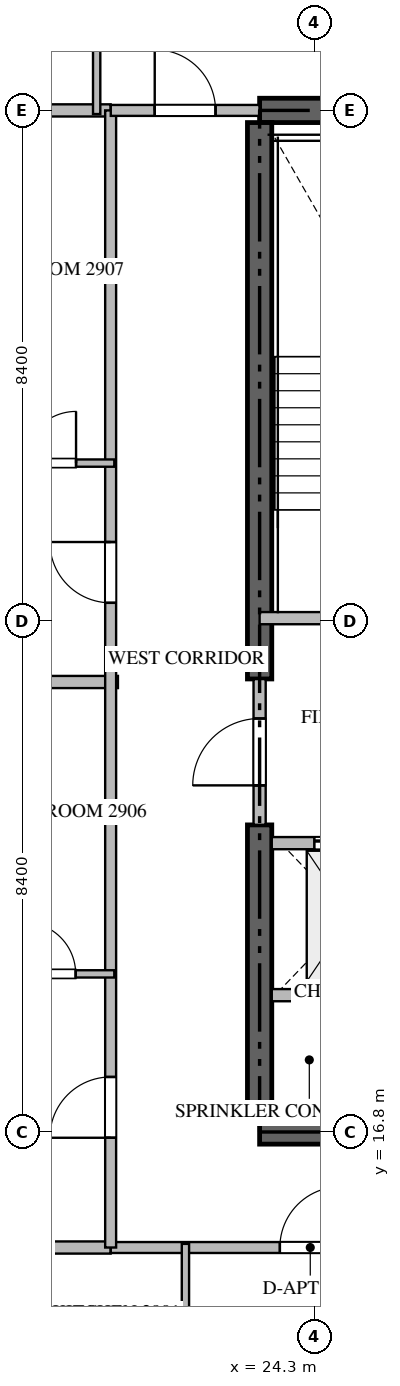
"""IFC4 building model, lengths in metres.
Left out: names, types, materials, properties, quantities, classifications, styles, units other than length and angle.
Written with IfcOpenShell. Run it as: python <this file> out.ifc"""

import sys

from ifc_helpers import new_model, si_unit, direction, frame, frame_2d, origin, place, context, subcontext, project, spatial, rectangle, extrude, source, transform, mapped, element, fill, save


model = new_model("IFC4")
c1 = context("Model", 3, precision=1e-05, world=origin(), true_north=direction((0.0, 1.0)))
c2 = subcontext(c1, "Body", "Model", "MODEL_VIEW")
j1 = project(units=[si_unit("LENGTHUNIT", "METRE"), si_unit("PLANEANGLEUNIT", "RADIAN")], contexts=[c1])
p1 = place(None, origin())
s1 = spatial("IfcSite", under=j1, at=p1, CompositionType="ELEMENT")
p2 = place(p1, origin())
s2 = spatial("IfcBuilding", under=s1, at=p2, CompositionType="ELEMENT")
p3 = place(p2, frame((0.0, 0.0, 120.15)))
s3 = spatial("IfcBuildingStorey", under=s2, at=p3, CompositionType="ELEMENT", Elevation=120.15)
for number, where, z_axis, x_axis in (
    (1, (23.4, 16.8, -0.44), (0.0, 0.0, 1.0), (1.0, 0.0, 0.0)),
    (2, (41.4, 33.6, -0.44), (0.0, 0.0, 1.0), (-1.0, 0.0, 0.0)),
):
    element("IfcWall", number, at=place(p3, frame(where, z_axis=z_axis, x_axis=x_axis)), inside=s3, PredefinedType="SHEAR", context=c2, shape_type="SweptSolid", body=[
        extrude(rectangle(XDim=18.0, YDim=0.4, at=frame_2d((9.0, 0.0))), origin(), (0.0, 0.0, 1.0), 3.928),
    ])
p4 = place(p3, frame((23.4, 17.0, -0.44), z_axis=(0.0, 0.0, 1.0), x_axis=(0.0, 1.0, 0.0)))
e3 = element("IfcWall", 3, at=p4, inside=s3, PredefinedType="SHEAR", context=c2, shape_type="SweptSolid", body=[
    extrude(rectangle(XDim=4.85, YDim=0.4, at=frame_2d((2.425, 0.0))), origin(), (0.0, 0.0, 1.0), 3.928),
])
p5 = place(p3, frame((23.4, 24.25, -0.44), z_axis=(0.0, 0.0, 1.0), x_axis=(0.0, 1.0, 0.0)))
e4 = element("IfcWall", 4, at=p5, inside=s3, PredefinedType="SHEAR", context=c2, shape_type="SweptSolid", body=[
    extrude(rectangle(XDim=9.15, YDim=0.4, at=frame_2d((4.575, 0.0))), origin(), (0.0, 0.0, 1.0), 3.928),
])
p6 = place(p3, frame((23.4, 25.25, 0.0), z_axis=(0.0, 0.0, 1.0), x_axis=(1.0, 0.0, 0.0)))
e5 = element("IfcWall", 5, at=p6, inside=s3, PredefinedType="STANDARD", context=c2, shape_type="SweptSolid", body=[
    extrude(rectangle(XDim=4.45, YDim=0.2, at=frame_2d((2.225, 0.0))), origin(), (0.0, 0.0, 1.0), 3.49),
])
p7 = place(p6, frame((1.65, 0.0, 0.0)))
e6 = element("IfcOpeningElement", 6, at=p7, cuts=e5, PredefinedType="OPENING", context=c2, shape_type="SweptSolid", body=[
    extrude(rectangle(XDim=1.1, YDim=2.15, at=frame_2d((0.55, 1.075))), frame((0.0, 0.11, 0.0), z_axis=(0.0, -1.0, 0.0), x_axis=(1.0, 0.0, 0.0)), (0.0, 0.0, 1.0), 0.22),
])
p8 = place(p3, frame((23.6, 21.55, 0.0), z_axis=(0.0, 0.0, 1.0), x_axis=(1.0, 0.0, 0.0)))
e7 = element("IfcWall", 7, at=p8, inside=s3, PredefinedType="STANDARD", context=c2, shape_type="SweptSolid", body=[
    extrude(rectangle(XDim=2.45, YDim=0.2, at=frame_2d((1.225, 0.0))), origin(), (0.0, 0.0, 1.0), 3.49),
])
p9 = place(p8, frame((0.7, 0.0, 0.0)))
e8 = element("IfcOpeningElement", 8, at=p9, cuts=e7, PredefinedType="OPENING", context=c2, shape_type="SweptSolid", body=[
    extrude(rectangle(XDim=1.2, YDim=2.2, at=frame_2d((0.6, 1.1))), frame((0.0, 0.11, 0.0), z_axis=(0.0, -1.0, 0.0), x_axis=(1.0, 0.0, 0.0)), (0.0, 0.0, 1.0), 0.22),
])
p10 = place(p3, frame((23.6, 19.05, 0.0), z_axis=(0.0, 0.0, 1.0), x_axis=(1.0, 0.0, 0.0)))
e9 = element("IfcWall", 9, at=p10, inside=s3, PredefinedType="STANDARD", context=c2, shape_type="SweptSolid", body=[
    extrude(rectangle(XDim=2.45, YDim=0.2, at=frame_2d((1.225, 0.0))), origin(), (0.0, 0.0, 1.0), 3.49),
])
p11 = place(p3, frame((23.4, 21.852, 0.0), z_axis=(0.0, 0.0, 1.0), x_axis=(0.0, 1.0, 0.0)))
e10 = element("IfcWall", 10, at=p11, inside=s3, PredefinedType="STANDARD", context=c2, shape_type="SweptSolid", body=[
    extrude(rectangle(XDim=2.396, YDim=0.2, at=frame_2d((1.198, 0.0))), origin(), (0.0, 0.0, 1.0), 3.49),
])
p12 = place(p11, frame((0.648, 0.0, 0.0)))
e11 = element("IfcOpeningElement", 11, at=p12, cuts=e10, PredefinedType="OPENING", context=c2, shape_type="SweptSolid", body=[
    extrude(rectangle(XDim=1.1, YDim=2.15, at=frame_2d((0.55, 1.075))), frame((0.0, 0.11, 0.0), z_axis=(0.0, -1.0, 0.0), x_axis=(1.0, 0.0, 0.0)), (0.0, 0.0, 1.0), 0.22),
])
p13 = place(p3, frame((7.882, 24.2, 0.0), z_axis=(0.0, 0.0, 1.0), x_axis=(1.0, 0.0, 0.0)))
e12 = element("IfcWall", 12, at=p13, inside=s3, PredefinedType="PARTITIONING", context=c2, shape_type="SweptSolid", body=[
    extrude(rectangle(XDim=13.188, YDim=0.2, at=frame_2d((6.594, 0.0))), origin(), (0.0, 0.0, 1.0), 3.49),
])
for number, where, z_axis, x_axis in (
    (13, (7.882, 14.9, 0.0), (0.0, 0.0, 1.0), (1.0, 0.0, 0.0)),
    (14, (7.882, 33.6, 0.0), (0.0, 0.0, 1.0), (1.0, 0.0, 0.0)),
):
    element("IfcWall", number, at=place(p3, frame(where, z_axis=z_axis, x_axis=x_axis)), inside=s3, PredefinedType="PARTITIONING", context=c2, shape_type="SweptSolid", body=[
        extrude(rectangle(XDim=13.068, YDim=0.2, at=frame_2d((6.534, 0.0))), origin(), (0.0, 0.0, 1.0), 3.49),
    ])
p14 = place(p3, frame((20.952, 14.9, 0.0), z_axis=(0.0, 0.0, 1.0), x_axis=(1.0, 0.0, 0.0)))
e15 = element("IfcWall", 15, at=p14, inside=s3, PredefinedType="PARTITIONING", context=c2, shape_type="SweptSolid", body=[
    extrude(rectangle(XDim=22.896, YDim=0.18, at=frame_2d((11.448, 0.0))), origin(), (0.0, 0.0, 1.0), 3.49),
])
p15 = place(p14, frame((2.781, 0.0, 0.0)))
e16 = element("IfcOpeningElement", 16, at=p15, cuts=e15, PredefinedType="OPENING", context=c2, shape_type="SweptSolid", body=[
    extrude(rectangle(XDim=1.0, YDim=2.15, at=frame_2d((0.5, 1.075))), frame((0.0, 0.1, 0.0), z_axis=(0.0, -1.0, 0.0), x_axis=(1.0, 0.0, 0.0)), (0.0, 0.0, 1.0), 0.2),
])
p16 = place(p14, frame((7.16, 0.0, 0.0)))
e17 = element("IfcOpeningElement", 17, at=p16, cuts=e15, PredefinedType="OPENING", context=c2, shape_type="SweptSolid", body=[
    extrude(rectangle(XDim=1.0, YDim=2.15, at=frame_2d((0.5, 1.075))), frame((0.0, 0.1, 0.0), z_axis=(0.0, -1.0, 0.0), x_axis=(1.0, 0.0, 0.0)), (0.0, 0.0, 1.0), 0.2),
])
p17 = place(p14, frame((19.115, 0.0, 0.0)))
e18 = element("IfcOpeningElement", 18, at=p17, cuts=e15, PredefinedType="OPENING", context=c2, shape_type="SweptSolid", body=[
    extrude(rectangle(XDim=1.0, YDim=2.15, at=frame_2d((0.5, 1.075))), frame((0.0, 0.1, 0.0), z_axis=(0.0, -1.0, 0.0), x_axis=(1.0, 0.0, 0.0)), (0.0, 0.0, 1.0), 0.2),
])
p18 = place(p3, frame((20.95, 14.9, 0.0), z_axis=(0.0, 0.0, 1.0), x_axis=(0.0, 1.0, 0.0)))
e19 = element("IfcWall", 19, at=p18, inside=s3, PredefinedType="PARTITIONING", context=c2, shape_type="SweptSolid", body=[
    extrude(rectangle(XDim=18.7, YDim=0.18, at=frame_2d((9.35, 0.0))), origin(), (0.0, 0.0, 1.0), 3.49),
])
p19 = place(p18, frame((1.805, 0.0, 0.0)))
e20 = element("IfcOpeningElement", 20, at=p19, cuts=e19, PredefinedType="OPENING", context=c2, shape_type="SweptSolid", body=[
    extrude(rectangle(XDim=1.0, YDim=2.15, at=frame_2d((0.5, 1.075))), frame((0.0, 0.1, 0.0), z_axis=(0.0, -1.0, 0.0), x_axis=(1.0, 0.0, 0.0)), (0.0, 0.0, 1.0), 0.2),
])
p20 = place(p18, frame((10.602, 0.0, 0.0)))
e21 = element("IfcOpeningElement", 21, at=p20, cuts=e19, PredefinedType="OPENING", context=c2, shape_type="SweptSolid", body=[
    extrude(rectangle(XDim=1.0, YDim=2.15, at=frame_2d((0.5, 1.075))), frame((0.0, 0.1, 0.0), z_axis=(0.0, -1.0, 0.0), x_axis=(1.0, 0.0, 0.0)), (0.0, 0.0, 1.0), 0.2),
])
p21 = place(p3, frame((20.952, 33.6, 0.0), z_axis=(0.0, 0.0, 1.0), x_axis=(1.0, 0.0, 0.0)))
e22 = element("IfcWall", 22, at=p21, inside=s3, PredefinedType="PARTITIONING", context=c2, shape_type="SweptSolid", body=[
    extrude(rectangle(XDim=2.446, YDim=0.18, at=frame_2d((1.223, 0.0))), origin(), (0.0, 0.0, 1.0), 3.49),
])
p22 = place(p21, frame((0.723, 0.0, 0.0)))
e23 = element("IfcOpeningElement", 23, at=p22, cuts=e22, PredefinedType="OPENING", context=c2, shape_type="SweptSolid", body=[
    extrude(rectangle(XDim=1.0, YDim=2.15, at=frame_2d((0.5, 1.075))), frame((0.0, 0.1, 0.0), z_axis=(0.0, -1.0, 0.0), x_axis=(1.0, 0.0, 0.0)), (0.0, 0.0, 1.0), 0.2),
])
for number, where, z_axis, x_axis in (
    (24, (22.18, 12.15, 0.0), (0.0, 0.0, 1.0), (0.0, 1.0, 0.0)),
    (25, (20.72, 36.35, 0.0), (0.0, 0.0, 1.0), (0.0, -1.0, 0.0)),
):
    element("IfcWall", number, at=place(p3, frame(where, z_axis=z_axis, x_axis=x_axis)), inside=s3, PredefinedType="PARTITIONING", context=c2, shape_type="SweptSolid", body=[
        extrude(rectangle(XDim=2.81, YDim=0.12, at=frame_2d((1.405, 0.0))), origin(), (0.0, 0.0, 1.0), 3.49),
    ])
p23 = place(p3, frame((18.889, 19.4, 0.0), z_axis=(0.0, 0.0, 1.0), x_axis=(1.0, 0.0, 0.0)))
e26 = element("IfcWall", 26, at=p23, inside=s3, PredefinedType="PARTITIONING", context=c2, shape_type="SweptSolid", body=[
    extrude(rectangle(XDim=2.121, YDim=0.12, at=frame_2d((1.061, 0.0))), origin(), (0.0, 0.0, 1.0), 3.49),
])
p24 = place(p23, frame((0.636, 0.0, 0.0)))
e27 = element("IfcOpeningElement", 27, at=p24, cuts=e26, PredefinedType="OPENING", context=c2, shape_type="SweptSolid", body=[
    extrude(rectangle(XDim=0.85, YDim=2.1, at=frame_2d((0.425, 1.05))), frame((0.0, 0.07, 0.0), z_axis=(0.0, -1.0, 0.0), x_axis=(1.0, 0.0, 0.0)), (0.0, 0.0, 1.0), 0.14),
])
p25 = place(p3, frame((18.902, 27.8, 0.0), z_axis=(0.0, 0.0, 1.0), x_axis=(1.0, 0.0, 0.0)))
e28 = element("IfcWall", 28, at=p25, inside=s3, PredefinedType="PARTITIONING", context=c2, shape_type="SweptSolid", body=[
    extrude(rectangle(XDim=2.108, YDim=0.12, at=frame_2d((1.054, 0.0))), origin(), (0.0, 0.0, 1.0), 3.49),
])
p26 = place(p25, frame((0.629, 0.0, 0.0)))
e29 = element("IfcOpeningElement", 29, at=p26, cuts=e28, PredefinedType="OPENING", context=c2, shape_type="SweptSolid", body=[
    extrude(rectangle(XDim=0.85, YDim=2.1, at=frame_2d((0.425, 1.05))), frame((0.0, 0.07, 0.0), z_axis=(0.0, -1.0, 0.0), x_axis=(1.0, 0.0, 0.0)), (0.0, 0.0, 1.0), 0.14),
])
m1 = source(origin(), c2, "Body", "SweptSolid", [
    extrude(rectangle(XDim=1.2, YDim=2.2, at=frame_2d((0.6, 1.1))), frame((0.0, 0.025, 0.0), z_axis=(0.0, -1.0, 0.0), x_axis=(1.0, 0.0, 0.0)), (0.0, 0.0, 1.0), 0.05),
])
p27 = place(p9, origin())
e30 = element("IfcDoor", 30, at=p27, inside=s3, OperationType="DOUBLE_DOOR_SLIDING", PredefinedType="DOOR", context=c2, shape_type="MappedRepresentation", body=[
    mapped(m1, transform((0.0, 0.0, 0.0), scale=1.0)),
])
fill(e8, e30)
m2 = source(origin(), c2, "Body", "SweptSolid", [
    extrude(rectangle(XDim=1.1, YDim=2.15, at=frame_2d((0.55, 1.075))), frame((0.0, 0.025, 0.0), z_axis=(0.0, -1.0, 0.0), x_axis=(1.0, 0.0, 0.0)), (0.0, 0.0, 1.0), 0.05),
])
p28 = place(p12, origin())
e31 = element("IfcDoor", 31, at=p28, inside=s3, OperationType="SINGLE_SWING_LEFT", PredefinedType="DOOR", context=c2, shape_type="MappedRepresentation", body=[
    mapped(m2, transform((0.0, 0.0, 0.0), scale=1.0)),
])
fill(e11, e31)
m3 = source(origin(), c2, "Body", "SweptSolid", [
    extrude(rectangle(XDim=1.0, YDim=2.15, at=frame_2d((0.5, 1.075))), frame((0.0, 0.025, 0.0), z_axis=(0.0, -1.0, 0.0), x_axis=(1.0, 0.0, 0.0)), (0.0, 0.0, 1.0), 0.05),
])
p29 = place(p15, origin())
e32 = element("IfcDoor", 32, at=p29, inside=s3, OperationType="SINGLE_SWING_RIGHT", PredefinedType="DOOR", context=c2, shape_type="MappedRepresentation", body=[
    mapped(m3, transform((0.0, 0.0, 0.0), scale=1.0)),
])
fill(e16, e32)
p30 = place(p19, origin())
e33 = element("IfcDoor", 33, at=p30, inside=s3, OperationType="SINGLE_SWING_LEFT", PredefinedType="DOOR", context=c2, shape_type="MappedRepresentation", body=[
    mapped(m3, transform((0.0, 0.0, 0.0), scale=1.0)),
])
fill(e20, e33)
p31 = place(p20, origin())
e34 = element("IfcDoor", 34, at=p31, inside=s3, OperationType="SINGLE_SWING_RIGHT", PredefinedType="DOOR", context=c2, shape_type="MappedRepresentation", body=[
    mapped(m3, transform((0.0, 0.0, 0.0), scale=1.0)),
])
fill(e21, e34)
p32 = place(p22, origin())
e35 = element("IfcDoor", 35, at=p32, inside=s3, OperationType="SINGLE_SWING_LEFT", PredefinedType="DOOR", context=c2, shape_type="MappedRepresentation", body=[
    mapped(m3, transform((0.0, 0.0, 0.0), scale=1.0)),
])
fill(e23, e35)
m4 = source(origin(), c2, "Body", "SweptSolid", [
    extrude(rectangle(XDim=0.85, YDim=2.1, at=frame_2d((0.425, 1.05))), frame((0.0, 0.025, 0.0), z_axis=(0.0, -1.0, 0.0), x_axis=(1.0, 0.0, 0.0)), (0.0, 0.0, 1.0), 0.05),
])
p33 = place(p24, origin())
e36 = element("IfcDoor", 36, at=p33, inside=s3, OperationType="SINGLE_SWING_LEFT", PredefinedType="DOOR", context=c2, shape_type="MappedRepresentation", body=[
    mapped(m4, transform((0.0, 0.0, 0.0), scale=1.0)),
])
fill(e27, e36)
p34 = place(p26, origin())
e37 = element("IfcDoor", 37, at=p34, inside=s3, OperationType="SINGLE_SWING_RIGHT", PredefinedType="DOOR", context=c2, shape_type="MappedRepresentation", body=[
    mapped(m4, transform((0.0, 0.0, 0.0), scale=1.0)),
])
fill(e29, e37)
save(model, sys.argv[1])
